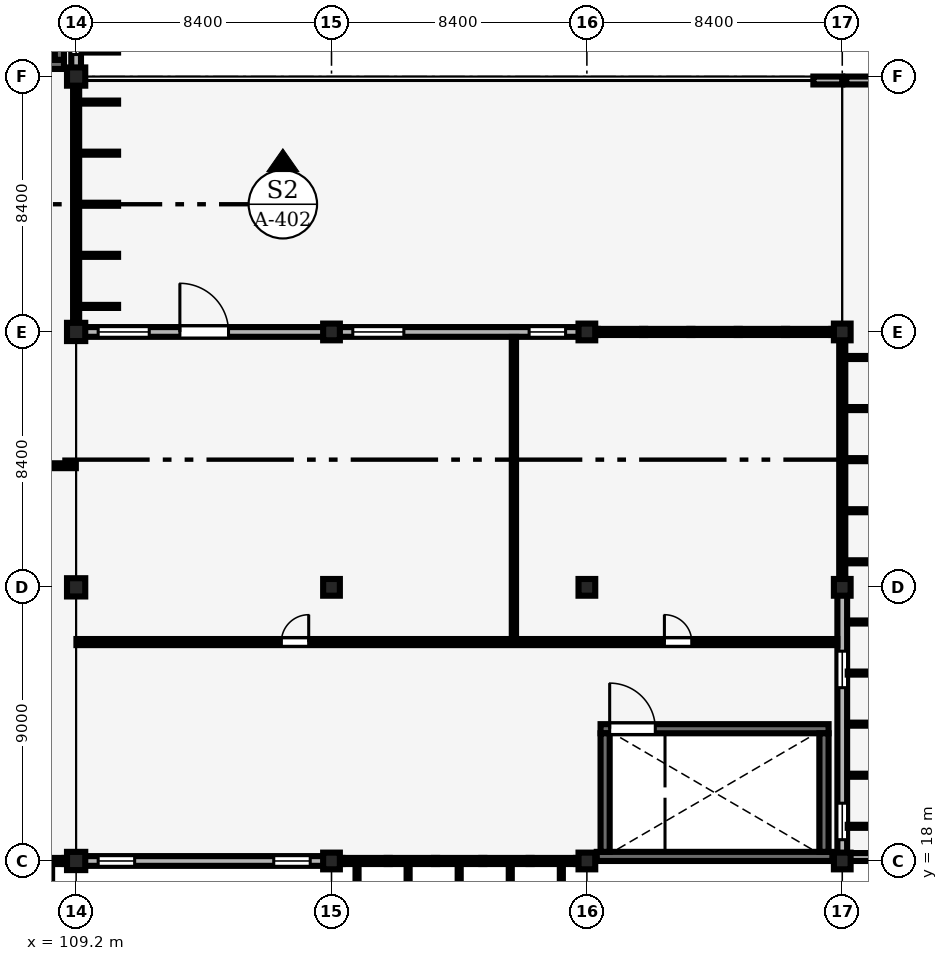
"""IFC4 building model, lengths in metres.
Left out: names, types, materials, properties, quantities, classifications, styles, units other than length and angle.
Written with IfcOpenShell. Run it as: python <this file> out.ifc"""

import sys

from ifc_helpers import new_model, si_unit, direction, frame, frame_2d, origin, origin_2d, place, context, subcontext, project, spatial, rectangle, extrude, element, fill, save


model = new_model("IFC4")
c1 = context("Model", 3, precision=1e-05, world=origin(), true_north=direction((0.0, 1.0)))
c2 = subcontext(c1, "Body", "Model", "MODEL_VIEW")
j1 = project(units=[si_unit("LENGTHUNIT", "METRE"), si_unit("PLANEANGLEUNIT", "RADIAN")], contexts=[c1])
p1 = place(None, origin())
s1 = spatial("IfcSite", under=j1, at=p1, CompositionType="ELEMENT")
p2 = place(p1, origin())
s2 = spatial("IfcBuilding", under=s1, at=p2, CompositionType="ELEMENT")
p3 = place(p2, frame((0.0, 0.0, 9.0)))
s3 = spatial("IfcBuildingStorey", under=s2, at=p3, CompositionType="ELEMENT", Elevation=9.0)
for number, where, z_axis, x_axis in (
    (1, (109.2, 18.0, 0.0), (0.0, 0.0, 1.0), (1.0, 0.0, 0.0)),
    (2, (109.2, 27.0, 0.0), (0.0, 0.0, 1.0), (1.0, 0.0, 0.0)),
    (3, (109.2, 35.4, 0.0), (0.0, 0.0, 1.0), (1.0, 0.0, 0.0)),
    (4, (109.2, 43.8, 0.0), (0.0, 0.0, 1.0), (1.0, 0.0, 0.0)),
):
    element("IfcColumn", number, at=place(p3, frame(where, z_axis=z_axis, x_axis=x_axis)), inside=s3, PredefinedType="COLUMN", context=c2, shape_type="SweptSolid", body=[
        extrude(rectangle(XDim=0.6, YDim=0.6, at=origin_2d()), origin(), (0.0, 0.0, 1.0), 4.2),
    ])
for number, where, z_axis, x_axis in (
    (5, (117.6, 18.0, 0.0), (0.0, 0.0, 1.0), (1.0, 0.0, 0.0)),
    (6, (117.6, 27.0, 0.0), (0.0, 0.0, 1.0), (1.0, 0.0, 0.0)),
    (7, (117.6, 35.4, 0.0), (0.0, 0.0, 1.0), (1.0, 0.0, 0.0)),
    (8, (126.0, 18.0, 0.0), (0.0, 0.0, 1.0), (1.0, 0.0, 0.0)),
    (9, (126.0, 27.0, 0.0), (0.0, 0.0, 1.0), (1.0, 0.0, 0.0)),
    (10, (126.0, 35.4, 0.0), (0.0, 0.0, 1.0), (1.0, 0.0, 0.0)),
    (11, (134.4, 18.0, 0.0), (0.0, 0.0, 1.0), (1.0, 0.0, 0.0)),
    (12, (134.4, 27.0, 0.0), (0.0, 0.0, 1.0), (1.0, 0.0, 0.0)),
    (13, (134.4, 35.4, 0.0), (0.0, 0.0, 1.0), (1.0, 0.0, 0.0)),
):
    element("IfcColumn", number, at=place(p3, frame(where, z_axis=z_axis, x_axis=x_axis)), inside=s3, PredefinedType="COLUMN", context=c2, shape_type="SweptSolid", body=[
        extrude(rectangle(XDim=0.55, YDim=0.55, at=origin_2d()), origin(), (0.0, 0.0, 1.0), 4.2),
    ])
p4 = place(p3, frame((109.475, 35.4, 0.0), z_axis=(0.0, 0.0, 1.0), x_axis=(1.0, 0.0, 0.0)))
e14 = element("IfcWall", 14, at=p4, inside=s3, PredefinedType="SOLIDWALL", context=c2, shape_type="SweptSolid", body=[
    extrude(rectangle(XDim=7.875, YDim=0.32, at=frame_2d((3.938, 0.0))), origin(), (0.0, 0.0, 1.0), 3.48),
])
p5 = place(p4, frame((3.137, 0.0, 0.0)))
e15 = element("IfcOpeningElement", 15, at=p5, cuts=e14, PredefinedType="OPENING", context=c2, shape_type="SweptSolid", body=[
    extrude(rectangle(XDim=1.6, YDim=2.3, at=frame_2d((0.8, 1.15))), frame((0.0, 0.17, 0.0), z_axis=(0.0, -1.0, 0.0), x_axis=(1.0, 0.0, 0.0)), (0.0, 0.0, 1.0), 0.34),
])
p6 = place(p4, frame((0.45, 0.0, 0.95)))
e16 = element("IfcOpeningElement", 16, at=p6, cuts=e14, PredefinedType="OPENING", context=c2, shape_type="SweptSolid", body=[
    extrude(rectangle(XDim=1.68, YDim=1.8, at=frame_2d((0.84, 0.9))), frame((0.0, 0.17, 0.0), z_axis=(0.0, -1.0, 0.0), x_axis=(1.0, 0.0, 0.0)), (0.0, 0.0, 1.0), 0.34),
])
p7 = place(p3, frame((117.85, 35.4, 0.0), z_axis=(0.0, 0.0, 1.0), x_axis=(1.0, 0.0, 0.0)))
e17 = element("IfcWall", 17, at=p7, inside=s3, PredefinedType="SOLIDWALL", context=c2, shape_type="SweptSolid", body=[
    extrude(rectangle(XDim=7.9, YDim=0.32, at=frame_2d((3.95, 0.0))), origin(), (0.0, 0.0, 1.0), 3.43),
])
p8 = place(p7, frame((0.45, 0.0, 0.9)))
e18 = element("IfcOpeningElement", 18, at=p8, cuts=e17, PredefinedType="OPENING", context=c2, shape_type="SweptSolid", body=[
    extrude(rectangle(XDim=1.68, YDim=2.4, at=frame_2d((0.84, 1.2))), frame((0.0, 0.17, 0.0), z_axis=(0.0, -1.0, 0.0), x_axis=(1.0, 0.0, 0.0)), (0.0, 0.0, 1.0), 0.34),
])
p9 = place(p7, frame((6.25, 0.0, 0.9)))
e19 = element("IfcOpeningElement", 19, at=p9, cuts=e17, PredefinedType="OPENING", context=c2, shape_type="SweptSolid", body=[
    extrude(rectangle(XDim=1.2, YDim=1.5, at=frame_2d((0.6, 0.75))), frame((0.0, 0.17, 0.0), z_axis=(0.0, -1.0, 0.0), x_axis=(1.0, 0.0, 0.0)), (0.0, 0.0, 1.0), 0.34),
])
p10 = place(p3, frame((109.2, 44.075, 0.0), z_axis=(0.0, 0.0, 1.0), x_axis=(0.0, 1.0, 0.0)))
e20 = element("IfcWall", 20, at=p10, inside=s3, PredefinedType="SOLIDWALL", context=c2, shape_type="SweptSolid", body=[
    extrude(rectangle(XDim=7.85, YDim=0.32, at=frame_2d((3.925, 0.0))), origin(), (0.0, 0.0, 1.0), 3.34),
])
p11 = place(p10, frame((0.45, 0.0, 0.85)))
e21 = element("IfcOpeningElement", 21, at=p11, cuts=e20, PredefinedType="OPENING", context=c2, shape_type="SweptSolid", body=[
    extrude(rectangle(XDim=1.2, YDim=1.8, at=frame_2d((0.6, 0.9))), frame((0.0, 0.17, 0.0), z_axis=(0.0, -1.0, 0.0), x_axis=(1.0, 0.0, 0.0)), (0.0, 0.0, 1.0), 0.34),
])
p12 = place(p10, frame((6.2, 0.0, 0.85)))
e22 = element("IfcOpeningElement", 22, at=p12, cuts=e20, PredefinedType="OPENING", context=c2, shape_type="SweptSolid", body=[
    extrude(rectangle(XDim=1.2, YDim=1.8, at=frame_2d((0.6, 0.9))), frame((0.0, 0.17, 0.0), z_axis=(0.0, -1.0, 0.0), x_axis=(1.0, 0.0, 0.0)), (0.0, 0.0, 1.0), 0.34),
])
p13 = place(p3, frame((109.475, 18.0, 0.0), z_axis=(0.0, 0.0, 1.0), x_axis=(1.0, 0.0, 0.0)))
e23 = element("IfcWall", 23, at=p13, inside=s3, PredefinedType="SOLIDWALL", context=c2, shape_type="SweptSolid", body=[
    extrude(rectangle(XDim=7.875, YDim=0.32, at=frame_2d((3.938, 0.0))), origin(), (0.0, 0.0, 1.0), 3.43),
])
p14 = place(p13, frame((0.45, 0.0, 0.9)))
e24 = element("IfcOpeningElement", 24, at=p14, cuts=e23, PredefinedType="OPENING", context=c2, shape_type="SweptSolid", body=[
    extrude(rectangle(XDim=1.2, YDim=1.5, at=frame_2d((0.6, 0.75))), frame((0.0, 0.17, 0.0), z_axis=(0.0, -1.0, 0.0), x_axis=(1.0, 0.0, 0.0)), (0.0, 0.0, 1.0), 0.34),
])
p15 = place(p13, frame((6.225, 0.0, 0.9)))
e25 = element("IfcOpeningElement", 25, at=p15, cuts=e23, PredefinedType="OPENING", context=c2, shape_type="SweptSolid", body=[
    extrude(rectangle(XDim=1.2, YDim=1.8, at=frame_2d((0.6, 0.9))), frame((0.0, 0.17, 0.0), z_axis=(0.0, -1.0, 0.0), x_axis=(1.0, 0.0, 0.0)), (0.0, 0.0, 1.0), 0.34),
])
p16 = place(p3, frame((134.4, 18.25, 0.0), z_axis=(0.0, 0.0, 1.0), x_axis=(0.0, 1.0, 0.0)))
e26 = element("IfcWall", 26, at=p16, inside=s3, PredefinedType="SOLIDWALL", context=c2, shape_type="SweptSolid", body=[
    extrude(rectangle(XDim=8.5, YDim=0.32, at=frame_2d((4.25, 0.0))), origin(), (0.0, 0.0, 1.0), 3.43),
])
p17 = place(p16, frame((0.45, 0.0, 0.85)))
e27 = element("IfcOpeningElement", 27, at=p17, cuts=e26, PredefinedType="OPENING", context=c2, shape_type="SweptSolid", body=[
    extrude(rectangle(XDim=1.2, YDim=1.8, at=frame_2d((0.6, 0.9))), frame((0.0, 0.17, 0.0), z_axis=(0.0, -1.0, 0.0), x_axis=(1.0, 0.0, 0.0)), (0.0, 0.0, 1.0), 0.34),
])
p18 = place(p16, frame((5.45, 0.0, 0.85)))
e28 = element("IfcOpeningElement", 28, at=p18, cuts=e26, PredefinedType="OPENING", context=c2, shape_type="SweptSolid", body=[
    extrude(rectangle(XDim=1.2, YDim=1.8, at=frame_2d((0.6, 0.9))), frame((0.0, 0.17, 0.0), z_axis=(0.0, -1.0, 0.0), x_axis=(1.0, 0.0, 0.0)), (0.0, 0.0, 1.0), 0.34),
])
for number, where, z_axis, x_axis in (
    (29, (134.53, 18.13, 0.0), (0.0, 0.0, 1.0), (1.0, 0.0, 0.0)),
    (30, (134.53, 43.67, 0.0), (0.0, 0.0, 1.0), (1.0, 0.0, 0.0)),
):
    element("IfcWall", number, at=place(p3, frame(where, z_axis=z_axis, x_axis=x_axis)), inside=s3, PredefinedType="PARAPET", context=c2, shape_type="SweptSolid", body=[
        extrude(rectangle(XDim=8.14, YDim=0.26, at=frame_2d((4.07, 0.0))), origin(), (0.0, 0.0, 1.0), 0.85),
    ])
p19 = place(p3, frame((133.45, 43.67, 0.0), z_axis=(0.0, 0.0, 1.0), x_axis=(1.0, 0.0, 0.0)))
e31 = element("IfcWall", 31, at=p19, inside=s3, PredefinedType="PARAPET", context=c2, shape_type="SweptSolid", body=[
    extrude(rectangle(XDim=0.95, YDim=0.26, at=frame_2d((0.475, 0.0))), origin(), (0.0, 0.0, 1.0), 1.12),
])
p20 = place(p3, frame((101.2, 44.2, 0.0), z_axis=(0.0, 0.0, 1.0), x_axis=(1.0, 0.0, 0.0)))
e32 = element("IfcWall", 32, at=p20, inside=s3, PredefinedType="SHEAR", context=c2, shape_type="SweptSolid", body=[
    extrude(rectangle(XDim=7.6, YDim=0.3, at=frame_2d((3.8, 0.0))), origin(), (0.0, 0.0, 1.0), 4.025),
])
p21 = place(p3, frame((108.65, 44.35, 0.0), z_axis=(0.0, 0.0, 1.0), x_axis=(0.0, 1.0, 0.0)))
e33 = element("IfcWall", 33, at=p21, inside=s3, PredefinedType="SHEAR", context=c2, shape_type="SweptSolid", body=[
    extrude(rectangle(XDim=3.8, YDim=0.3, at=frame_2d((1.9, 0.0))), origin(), (0.0, 0.0, 1.0), 4.025),
])
p22 = place(p3, frame((126.325, 18.15, 0.0), z_axis=(0.0, 0.0, 1.0), x_axis=(1.0, 0.0, 0.0)))
e34 = element("IfcWall", 34, at=p22, inside=s3, PredefinedType="SHEAR", context=c2, shape_type="SweptSolid", body=[
    extrude(rectangle(XDim=7.75, YDim=0.3, at=frame_2d((3.875, 0.0))), origin(), (0.0, 0.0, 1.0), 4.025),
])
p23 = place(p3, frame((126.45, 22.35, 0.0), z_axis=(0.0, 0.0, 1.0), x_axis=(1.0, 0.0, 0.0)))
e35 = element("IfcWall", 35, at=p23, inside=s3, PredefinedType="SHEAR", context=c2, shape_type="SweptSolid", body=[
    extrude(rectangle(XDim=7.5, YDim=0.3, at=frame_2d((3.75, 0.0))), origin(), (0.0, 0.0, 1.0), 4.025),
])
p24 = place(p23, frame((0.3, 0.0, 0.0)))
e36 = element("IfcOpeningElement", 36, at=p24, cuts=e35, PredefinedType="OPENING", context=c2, shape_type="SweptSolid", body=[
    extrude(rectangle(XDim=1.5, YDim=2.2, at=frame_2d((0.75, 1.1))), frame((0.0, 0.16, 0.0), z_axis=(0.0, -1.0, 0.0), x_axis=(1.0, 0.0, 0.0)), (0.0, 0.0, 1.0), 0.32),
])
for number, where, z_axis, x_axis in (
    (37, (126.6, 18.3, 0.0), (0.0, 0.0, 1.0), (0.0, 1.0, 0.0)),
    (38, (133.8, 18.3, 0.0), (0.0, 0.0, 1.0), (0.0, 1.0, 0.0)),
):
    element("IfcWall", number, at=place(p3, frame(where, z_axis=z_axis, x_axis=x_axis)), inside=s3, PredefinedType="SHEAR", context=c2, shape_type="SweptSolid", body=[
        extrude(rectangle(XDim=3.9, YDim=0.3, at=frame_2d((1.95, 0.0))), origin(), (0.0, 0.0, 1.0), 4.025),
    ])
p25 = place(p3, frame((101.105, 31.0, 0.0), z_axis=(0.0, 0.0, 1.0), x_axis=(1.0, 0.0, 0.0)))
e39 = element("IfcWall", 39, at=p25, inside=s3, PredefinedType="PARTITIONING", context=c2, shape_type="SweptSolid", body=[
    extrude(rectangle(XDim=8.085, YDim=0.16, at=frame_2d((4.042, 0.0))), origin(), (0.0, 0.0, 1.0), 3.9),
])
p26 = place(p3, frame((123.6, 25.305, 0.0), z_axis=(0.0, 0.0, 1.0), x_axis=(0.0, 1.0, 0.0)))
e40 = element("IfcWall", 40, at=p26, inside=s3, PredefinedType="PARTITIONING", context=c2, shape_type="SweptSolid", body=[
    extrude(rectangle(XDim=9.93, YDim=0.14, at=frame_2d((4.965, 0.0))), origin(), (0.0, 0.0, 1.0), 3.9),
])
p27 = place(p3, frame((109.21, 25.2, 0.0), z_axis=(0.0, 0.0, 1.0), x_axis=(1.0, 0.0, 0.0)))
e41 = element("IfcWall", 41, at=p27, inside=s3, PredefinedType="PARTITIONING", context=c2, shape_type="SweptSolid", body=[
    extrude(rectangle(XDim=25.025, YDim=0.2, at=frame_2d((12.513, 0.0))), origin(), (0.0, 0.0, 1.0), 3.9),
])
p28 = place(p27, frame((6.74, 0.0, 0.0)))
e42 = element("IfcOpeningElement", 42, at=p28, cuts=e41, PredefinedType="OPENING", context=c2, shape_type="SweptSolid", body=[
    extrude(rectangle(XDim=0.9, YDim=2.1, at=frame_2d((0.45, 1.05))), frame((0.0, 0.11, 0.0), z_axis=(0.0, -1.0, 0.0), x_axis=(1.0, 0.0, 0.0)), (0.0, 0.0, 1.0), 0.22),
])
p29 = place(p27, frame((19.34, 0.0, 0.0)))
e43 = element("IfcOpeningElement", 43, at=p29, cuts=e41, PredefinedType="OPENING", context=c2, shape_type="SweptSolid", body=[
    extrude(rectangle(XDim=0.9, YDim=2.1, at=frame_2d((0.45, 1.05))), frame((0.0, 0.11, 0.0), z_axis=(0.0, -1.0, 0.0), x_axis=(1.0, 0.0, 0.0)), (0.0, 0.0, 1.0), 0.22),
])
p30 = place(p5, origin())
e44 = element("IfcDoor", 44, at=p30, inside=s3, OperationType="DOUBLE_DOOR_SINGLE_SWING", PredefinedType="DOOR", context=c2, shape_type="SweptSolid", body=[
    extrude(rectangle(XDim=1.6, YDim=2.3, at=frame_2d((0.8, 1.15))), frame((0.0, 0.025, 0.0), z_axis=(0.0, -1.0, 0.0), x_axis=(1.0, 0.0, 0.0)), (0.0, 0.0, 1.0), 0.05),
])
fill(e15, e44)
p31 = place(p6, origin())
e45 = element("IfcWindow", 45, at=p31, inside=s3, PartitioningType="SINGLE_PANEL", PredefinedType="WINDOW", context=c2, shape_type="SweptSolid", body=[
    extrude(rectangle(XDim=1.68, YDim=1.8, at=frame_2d((0.84, 0.9))), frame((0.0, 0.03, 0.0), z_axis=(0.0, -1.0, 0.0), x_axis=(1.0, 0.0, 0.0)), (0.0, 0.0, 1.0), 0.06),
])
fill(e16, e45)
p32 = place(p8, origin())
e46 = element("IfcWindow", 46, at=p32, inside=s3, PartitioningType="SINGLE_PANEL", PredefinedType="WINDOW", context=c2, shape_type="SweptSolid", body=[
    extrude(rectangle(XDim=1.68, YDim=2.4, at=frame_2d((0.84, 1.2))), frame((0.0, 0.03, 0.0), z_axis=(0.0, -1.0, 0.0), x_axis=(1.0, 0.0, 0.0)), (0.0, 0.0, 1.0), 0.06),
])
fill(e18, e46)
p33 = place(p9, origin())
e47 = element("IfcWindow", 47, at=p33, inside=s3, PartitioningType="SINGLE_PANEL", PredefinedType="WINDOW", context=c2, shape_type="SweptSolid", body=[
    extrude(rectangle(XDim=1.2, YDim=1.5, at=frame_2d((0.6, 0.75))), frame((0.0, 0.03, 0.0), z_axis=(0.0, -1.0, 0.0), x_axis=(1.0, 0.0, 0.0)), (0.0, 0.0, 1.0), 0.06),
])
fill(e19, e47)
p34 = place(p11, origin())
e48 = element("IfcWindow", 48, at=p34, inside=s3, PartitioningType="SINGLE_PANEL", PredefinedType="WINDOW", context=c2, shape_type="SweptSolid", body=[
    extrude(rectangle(XDim=1.2, YDim=1.8, at=frame_2d((0.6, 0.9))), frame((0.0, 0.03, 0.0), z_axis=(0.0, -1.0, 0.0), x_axis=(1.0, 0.0, 0.0)), (0.0, 0.0, 1.0), 0.06),
])
fill(e21, e48)
p35 = place(p14, origin())
e49 = element("IfcWindow", 49, at=p35, inside=s3, PartitioningType="SINGLE_PANEL", PredefinedType="WINDOW", context=c2, shape_type="SweptSolid", body=[
    extrude(rectangle(XDim=1.2, YDim=1.5, at=frame_2d((0.6, 0.75))), frame((0.0, 0.03, 0.0), z_axis=(0.0, -1.0, 0.0), x_axis=(1.0, 0.0, 0.0)), (0.0, 0.0, 1.0), 0.06),
])
fill(e24, e49)
p36 = place(p15, origin())
e50 = element("IfcWindow", 50, at=p36, inside=s3, PartitioningType="SINGLE_PANEL", PredefinedType="WINDOW", context=c2, shape_type="SweptSolid", body=[
    extrude(rectangle(XDim=1.2, YDim=1.8, at=frame_2d((0.6, 0.9))), frame((0.0, 0.03, 0.0), z_axis=(0.0, -1.0, 0.0), x_axis=(1.0, 0.0, 0.0)), (0.0, 0.0, 1.0), 0.06),
])
fill(e25, e50)
p37 = place(p17, origin())
e51 = element("IfcWindow", 51, at=p37, inside=s3, PartitioningType="SINGLE_PANEL", PredefinedType="WINDOW", context=c2, shape_type="SweptSolid", body=[
    extrude(rectangle(XDim=1.2, YDim=1.8, at=frame_2d((0.6, 0.9))), frame((0.0, 0.03, 0.0), z_axis=(0.0, -1.0, 0.0), x_axis=(1.0, 0.0, 0.0)), (0.0, 0.0, 1.0), 0.06),
])
fill(e27, e51)
p38 = place(p18, origin())
e52 = element("IfcWindow", 52, at=p38, inside=s3, PartitioningType="SINGLE_PANEL", PredefinedType="WINDOW", context=c2, shape_type="SweptSolid", body=[
    extrude(rectangle(XDim=1.2, YDim=1.8, at=frame_2d((0.6, 0.9))), frame((0.0, 0.03, 0.0), z_axis=(0.0, -1.0, 0.0), x_axis=(1.0, 0.0, 0.0)), (0.0, 0.0, 1.0), 0.06),
])
fill(e28, e52)
p39 = place(p24, origin())
e53 = element("IfcDoor", 53, at=p39, inside=s3, OperationType="DOUBLE_DOOR_SINGLE_SWING", PredefinedType="DOOR", context=c2, shape_type="SweptSolid", body=[
    extrude(rectangle(XDim=1.5, YDim=2.2, at=frame_2d((0.75, 1.1))), frame((0.0, 0.025, 0.0), z_axis=(0.0, -1.0, 0.0), x_axis=(1.0, 0.0, 0.0)), (0.0, 0.0, 1.0), 0.05),
])
fill(e36, e53)
p40 = place(p28, origin())
e54 = element("IfcDoor", 54, at=p40, inside=s3, OperationType="SINGLE_SWING_RIGHT", PredefinedType="DOOR", context=c2, shape_type="SweptSolid", body=[
    extrude(rectangle(XDim=0.9, YDim=2.1, at=frame_2d((0.45, 1.05))), frame((0.0, 0.025, 0.0), z_axis=(0.0, -1.0, 0.0), x_axis=(1.0, 0.0, 0.0)), (0.0, 0.0, 1.0), 0.05),
])
fill(e42, e54)
p41 = place(p29, origin())
e55 = element("IfcDoor", 55, at=p41, inside=s3, OperationType="SINGLE_SWING_LEFT", PredefinedType="DOOR", context=c2, shape_type="SweptSolid", body=[
    extrude(rectangle(XDim=0.9, YDim=2.1, at=frame_2d((0.45, 1.05))), frame((0.0, 0.025, 0.0), z_axis=(0.0, -1.0, 0.0), x_axis=(1.0, 0.0, 0.0)), (0.0, 0.0, 1.0), 0.05),
])
fill(e43, e55)
save(model, sys.argv[1])
